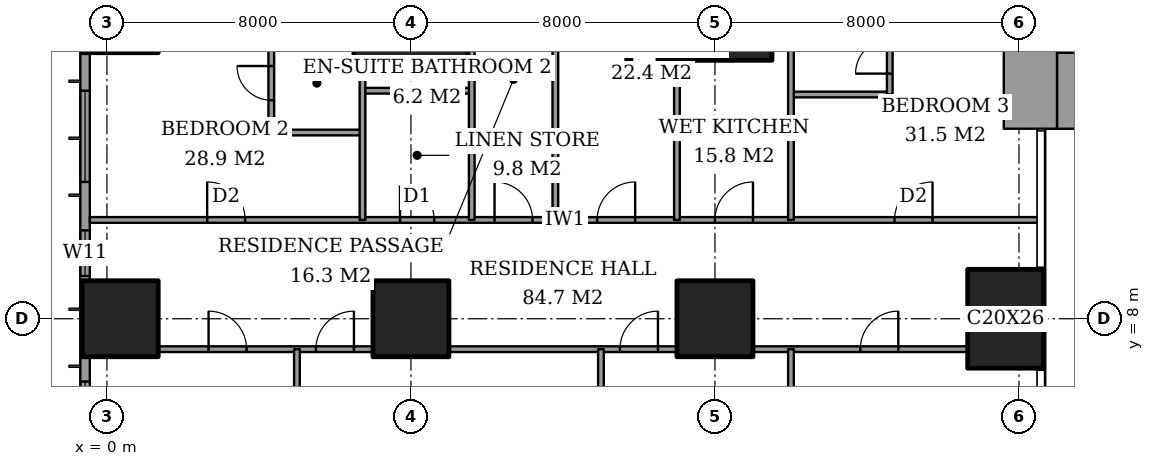
"""IFC4 building model, lengths in metres.
Left out: names, types, materials, properties, quantities, classifications, styles, units other than length and angle.
Written with IfcOpenShell. Run it as: python <this file> out.ifc"""

import sys

from ifc_helpers import new_model, si_unit, direction, frame, frame_2d, origin, origin_2d, place, context, subcontext, project, spatial, rectangle, extrude, element, fill, save


model = new_model("IFC4")
c1 = context("Model", 3, precision=1e-05, world=origin(), true_north=direction((0.0, 1.0)))
c2 = subcontext(c1, "Body", "Model", "MODEL_VIEW")
j1 = project(units=[si_unit("LENGTHUNIT", "METRE"), si_unit("PLANEANGLEUNIT", "RADIAN")], contexts=[c1])
p1 = place(None, origin())
s1 = spatial("IfcSite", under=j1, at=p1, CompositionType="ELEMENT")
p2 = place(p1, origin())
s2 = spatial("IfcBuilding", under=s1, at=p2, CompositionType="ELEMENT")
p3 = place(p2, frame((0.0, 0.0, 168.2)))
s3 = spatial("IfcBuildingStorey", under=s2, at=p3, CompositionType="ELEMENT", Elevation=168.2)
for number, where, z_axis, x_axis in (
    (1, (0.35, 8.0, 0.0), (0.0, 0.0, 1.0), (1.0, 0.0, 0.0)),
    (2, (8.0, 8.0, 0.0), (0.0, 0.0, 1.0), (1.0, 0.0, 0.0)),
):
    element("IfcColumn", number, at=place(p3, frame(where, z_axis=z_axis, x_axis=x_axis)), inside=s3, PredefinedType="COLUMN", context=c2, shape_type="SweptSolid", body=[
        extrude(rectangle(XDim=2.0, YDim=2.0, at=origin_2d()), origin(), (0.0, 0.0, 1.0), 3.6),
    ])
p4 = place(p3, frame((8.0, 16.0, 0.0), z_axis=(0.0, 0.0, 1.0), x_axis=(1.0, 0.0, 0.0)))
e3 = element("IfcColumn", 3, at=p4, inside=s3, PredefinedType="COLUMN", context=c2, shape_type="SweptSolid", body=[
    extrude(rectangle(XDim=3.0, YDim=2.4, at=origin_2d()), origin(), (0.0, 0.0, 1.0), 3.6),
])
p5 = place(p3, frame((16.0, 8.0, 0.0), z_axis=(0.0, 0.0, 1.0), x_axis=(1.0, 0.0, 0.0)))
e4 = element("IfcColumn", 4, at=p5, inside=s3, PredefinedType="COLUMN", context=c2, shape_type="SweptSolid", body=[
    extrude(rectangle(XDim=2.0, YDim=2.0, at=origin_2d()), origin(), (0.0, 0.0, 1.0), 3.6),
])
p6 = place(p3, frame((16.0, 16.0, 0.0), z_axis=(0.0, 0.0, 1.0), x_axis=(1.0, 0.0, 0.0)))
e5 = element("IfcColumn", 5, at=p6, inside=s3, PredefinedType="COLUMN", context=c2, shape_type="SweptSolid", body=[
    extrude(rectangle(XDim=3.0, YDim=2.4, at=origin_2d()), origin(), (0.0, 0.0, 1.0), 3.6),
])
p7 = place(p3, frame((23.65, 8.0, 0.0), z_axis=(0.0, 0.0, 1.0), x_axis=(1.0, 0.0, 0.0)))
e6 = element("IfcColumn", 6, at=p7, inside=s3, PredefinedType="COLUMN", context=c2, shape_type="SweptSolid", body=[
    extrude(rectangle(XDim=2.0, YDim=2.6, at=origin_2d()), origin(), (0.0, 0.0, 1.0), 3.6),
])
p8 = place(p3, frame((25.0, 14.0, 0.0), z_axis=(0.0, 0.0, 1.0), x_axis=(1.0, 0.0, 0.0)))
e7 = element("IfcWall", 7, at=p8, inside=s3, PredefinedType="SHEAR", context=c2, shape_type="SweptSolid", body=[
    extrude(rectangle(XDim=3.15, YDim=2.0, at=frame_2d((1.575, 0.0))), origin(), (0.0, 0.0, 1.0), 3.6),
])
p9 = place(p3, frame((24.3, 13.0, 0.0), z_axis=(0.0, 0.0, 1.0), x_axis=(0.0, 1.0, 0.0)))
e8 = element("IfcWall", 8, at=p9, inside=s3, PredefinedType="SHEAR", context=c2, shape_type="SweptSolid", body=[
    extrude(rectangle(XDim=10.15, YDim=1.4, at=frame_2d((5.075, 0.0))), origin(), (0.0, 0.0, 1.0), 3.6),
])
p10 = place(p3, frame((-0.575, 44.825, 0.0), z_axis=(0.0, 0.0, 1.0), x_axis=(0.0, -1.0, 0.0)))
e9 = element("IfcWall", 9, at=p10, inside=s3, PredefinedType="SOLIDWALL", context=c2, shape_type="SweptSolid", body=[
    extrude(rectangle(XDim=41.65, YDim=0.25, at=frame_2d((20.825, 0.0))), origin(), (0.0, 0.0, 1.0), 3.6),
])
p11 = place(p10, frame((0.775, 0.0, 0.4)))
e10 = element("IfcOpeningElement", 10, at=p11, cuts=e9, PredefinedType="OPENING", context=c2, shape_type="SweptSolid", body=[
    extrude(rectangle(XDim=2.4, YDim=2.2, at=frame_2d((1.2, 1.1))), frame((0.0, 0.135, 0.0), z_axis=(0.0, -1.0, 0.0), x_axis=(1.0, 0.0, 0.0)), (0.0, 0.0, 1.0), 0.27),
])
p12 = place(p10, frame((6.1, 0.0, 0.4)))
e11 = element("IfcOpeningElement", 11, at=p12, cuts=e9, PredefinedType="OPENING", context=c2, shape_type="SweptSolid", body=[
    extrude(rectangle(XDim=1.2, YDim=2.2, at=frame_2d((0.6, 1.1))), frame((0.0, 0.135, 0.0), z_axis=(0.0, -1.0, 0.0), x_axis=(1.0, 0.0, 0.0)), (0.0, 0.0, 1.0), 0.27),
])
p13 = place(p10, frame((8.425, 0.0, 0.4)))
e12 = element("IfcOpeningElement", 12, at=p13, cuts=e9, PredefinedType="OPENING", context=c2, shape_type="SweptSolid", body=[
    extrude(rectangle(XDim=2.4, YDim=2.2, at=frame_2d((1.2, 1.1))), frame((0.0, 0.135, 0.0), z_axis=(0.0, -1.0, 0.0), x_axis=(1.0, 0.0, 0.0)), (0.0, 0.0, 1.0), 0.27),
])
p14 = place(p10, frame((15.625, 0.0, 0.4)))
e13 = element("IfcOpeningElement", 13, at=p14, cuts=e9, PredefinedType="OPENING", context=c2, shape_type="SweptSolid", body=[
    extrude(rectangle(XDim=2.4, YDim=2.2, at=frame_2d((1.2, 1.1))), frame((0.0, 0.135, 0.0), z_axis=(0.0, -1.0, 0.0), x_axis=(1.0, 0.0, 0.0)), (0.0, 0.0, 1.0), 0.27),
])
p15 = place(p10, frame((23.625, 0.0, 0.4)))
e14 = element("IfcOpeningElement", 14, at=p15, cuts=e9, PredefinedType="OPENING", context=c2, shape_type="SweptSolid", body=[
    extrude(rectangle(XDim=2.4, YDim=2.2, at=frame_2d((1.2, 1.1))), frame((0.0, 0.135, 0.0), z_axis=(0.0, -1.0, 0.0), x_axis=(1.0, 0.0, 0.0)), (0.0, 0.0, 1.0), 0.27),
])
p16 = place(p10, frame((30.825, 0.0, 0.4)))
e15 = element("IfcOpeningElement", 15, at=p16, cuts=e9, PredefinedType="OPENING", context=c2, shape_type="SweptSolid", body=[
    extrude(rectangle(XDim=2.4, YDim=2.2, at=frame_2d((1.2, 1.1))), frame((0.0, 0.135, 0.0), z_axis=(0.0, -1.0, 0.0), x_axis=(1.0, 0.0, 0.0)), (0.0, 0.0, 1.0), 0.27),
])
p17 = place(p10, frame((34.5, 0.0, 0.4)))
e16 = element("IfcOpeningElement", 16, at=p17, cuts=e9, PredefinedType="OPENING", context=c2, shape_type="SweptSolid", body=[
    extrude(rectangle(XDim=1.2, YDim=2.2, at=frame_2d((0.6, 1.1))), frame((0.0, 0.135, 0.0), z_axis=(0.0, -1.0, 0.0), x_axis=(1.0, 0.0, 0.0)), (0.0, 0.0, 1.0), 0.27),
])
p18 = place(p10, frame((38.475, 0.0, 0.4)))
e17 = element("IfcOpeningElement", 17, at=p18, cuts=e9, PredefinedType="OPENING", context=c2, shape_type="SweptSolid", body=[
    extrude(rectangle(XDim=2.4, YDim=2.2, at=frame_2d((1.2, 1.1))), frame((0.0, 0.135, 0.0), z_axis=(0.0, -1.0, 0.0), x_axis=(1.0, 0.0, 0.0)), (0.0, 0.0, 1.0), 0.27),
])
p19 = place(p3, frame((1.35, 7.2, 0.0), z_axis=(0.0, 0.0, 1.0), x_axis=(1.0, 0.0, 0.0)))
e18 = element("IfcWall", 18, at=p19, inside=s3, PredefinedType="PARTITIONING", context=c2, shape_type="SweptSolid", body=[
    extrude(rectangle(XDim=5.65, YDim=0.15, at=frame_2d((2.825, 0.0))), origin(), (0.0, 0.0, 1.0), 3.25),
])
p20 = place(p19, frame((1.325, 0.0, 0.0)))
e19 = element("IfcOpeningElement", 19, at=p20, cuts=e18, PredefinedType="OPENING", context=c2, shape_type="SweptSolid", body=[
    extrude(rectangle(XDim=1.0, YDim=2.1, at=frame_2d((0.5, 1.05))), frame((0.0, 0.085, 0.0), z_axis=(0.0, -1.0, 0.0), x_axis=(1.0, 0.0, 0.0)), (0.0, 0.0, 1.0), 0.17),
])
p21 = place(p19, frame((4.15, 0.0, 0.0)))
e20 = element("IfcOpeningElement", 20, at=p21, cuts=e18, PredefinedType="OPENING", context=c2, shape_type="SweptSolid", body=[
    extrude(rectangle(XDim=1.0, YDim=2.1, at=frame_2d((0.5, 1.05))), frame((0.0, 0.085, 0.0), z_axis=(0.0, -1.0, 0.0), x_axis=(1.0, 0.0, 0.0)), (0.0, 0.0, 1.0), 0.17),
])
p22 = place(p3, frame((9.0, 7.2, 0.0), z_axis=(0.0, 0.0, 1.0), x_axis=(1.0, 0.0, 0.0)))
e21 = element("IfcWall", 21, at=p22, inside=s3, PredefinedType="PARTITIONING", context=c2, shape_type="SweptSolid", body=[
    extrude(rectangle(XDim=6.0, YDim=0.15, at=frame_2d((3.0, 0.0))), origin(), (0.0, 0.0, 1.0), 3.25),
])
p23 = place(p22, frame((4.5, 0.0, 0.0)))
e22 = element("IfcOpeningElement", 22, at=p23, cuts=e21, PredefinedType="OPENING", context=c2, shape_type="SweptSolid", body=[
    extrude(rectangle(XDim=1.0, YDim=2.1, at=frame_2d((0.5, 1.05))), frame((0.0, 0.085, 0.0), z_axis=(0.0, -1.0, 0.0), x_axis=(1.0, 0.0, 0.0)), (0.0, 0.0, 1.0), 0.17),
])
p24 = place(p3, frame((17.0, 7.2, 0.0), z_axis=(0.0, 0.0, 1.0), x_axis=(1.0, 0.0, 0.0)))
e23 = element("IfcWall", 23, at=p24, inside=s3, PredefinedType="PARTITIONING", context=c2, shape_type="SweptSolid", body=[
    extrude(rectangle(XDim=5.65, YDim=0.15, at=frame_2d((2.825, 0.0))), origin(), (0.0, 0.0, 1.0), 3.25),
])
p25 = place(p24, frame((2.825, 0.0, 0.0)))
e24 = element("IfcOpeningElement", 24, at=p25, cuts=e23, PredefinedType="OPENING", context=c2, shape_type="SweptSolid", body=[
    extrude(rectangle(XDim=1.0, YDim=2.1, at=frame_2d((0.5, 1.05))), frame((0.0, 0.085, 0.0), z_axis=(0.0, -1.0, 0.0), x_axis=(1.0, 0.0, 0.0)), (0.0, 0.0, 1.0), 0.17),
])
p26 = place(p3, frame((-0.45, 10.6, 0.0), z_axis=(0.0, 0.0, 1.0), x_axis=(1.0, 0.0, 0.0)))
e25 = element("IfcWall", 25, at=p26, inside=s3, PredefinedType="PARTITIONING", context=c2, shape_type="SweptSolid", body=[
    extrude(rectangle(XDim=25.011, YDim=0.15, at=frame_2d((12.505, 0.0))), origin(), (0.0, 0.0, 1.0), 3.25),
])
p27 = place(p26, frame((10.65, 0.0, 0.0)))
e26 = element("IfcOpeningElement", 26, at=p27, cuts=e25, PredefinedType="OPENING", context=c2, shape_type="SweptSolid", body=[
    extrude(rectangle(XDim=1.0, YDim=2.1, at=frame_2d((0.5, 1.05))), frame((0.0, 0.085, 0.0), z_axis=(0.0, -1.0, 0.0), x_axis=(1.0, 0.0, 0.0)), (0.0, 0.0, 1.0), 0.17),
])
p28 = place(p26, frame((3.087, 0.0, 0.0)))
e27 = element("IfcOpeningElement", 27, at=p28, cuts=e25, PredefinedType="OPENING", context=c2, shape_type="SweptSolid", body=[
    extrude(rectangle(XDim=1.0, YDim=2.1, at=frame_2d((0.5, 1.05))), frame((0.0, 0.085, 0.0), z_axis=(0.0, -1.0, 0.0), x_axis=(1.0, 0.0, 0.0)), (0.0, 0.0, 1.0), 0.17),
])
p29 = place(p26, frame((8.163, 0.0, 0.0)))
e28 = element("IfcOpeningElement", 28, at=p29, cuts=e25, PredefinedType="OPENING", context=c2, shape_type="SweptSolid", body=[
    extrude(rectangle(XDim=0.9, YDim=2.1, at=frame_2d((0.45, 1.05))), frame((0.0, 0.085, 0.0), z_axis=(0.0, -1.0, 0.0), x_axis=(1.0, 0.0, 0.0)), (0.0, 0.0, 1.0), 0.17),
])
p30 = place(p26, frame((13.35, 0.0, 0.0)))
e29 = element("IfcOpeningElement", 29, at=p30, cuts=e25, PredefinedType="OPENING", context=c2, shape_type="SweptSolid", body=[
    extrude(rectangle(XDim=1.0, YDim=2.1, at=frame_2d((0.5, 1.05))), frame((0.0, 0.085, 0.0), z_axis=(0.0, -1.0, 0.0), x_axis=(1.0, 0.0, 0.0)), (0.0, 0.0, 1.0), 0.17),
])
p31 = place(p26, frame((16.45, 0.0, 0.0)))
e30 = element("IfcOpeningElement", 30, at=p31, cuts=e25, PredefinedType="OPENING", context=c2, shape_type="SweptSolid", body=[
    extrude(rectangle(XDim=1.0, YDim=2.1, at=frame_2d((0.5, 1.05))), frame((0.0, 0.085, 0.0), z_axis=(0.0, -1.0, 0.0), x_axis=(1.0, 0.0, 0.0)), (0.0, 0.0, 1.0), 0.17),
])
p32 = place(p26, frame((21.175, 0.0, 0.0)))
e31 = element("IfcOpeningElement", 31, at=p32, cuts=e25, PredefinedType="OPENING", context=c2, shape_type="SweptSolid", body=[
    extrude(rectangle(XDim=1.0, YDim=2.1, at=frame_2d((0.5, 1.05))), frame((0.0, 0.085, 0.0), z_axis=(0.0, -1.0, 0.0), x_axis=(1.0, 0.0, 0.0)), (0.0, 0.0, 1.0), 0.17),
])
p33 = place(p3, frame((4.325, 12.9, 0.0), z_axis=(0.0, 0.0, 1.0), x_axis=(1.0, 0.0, 0.0)))
e32 = element("IfcWall", 32, at=p33, inside=s3, PredefinedType="PARTITIONING", context=c2, shape_type="SweptSolid", body=[
    extrude(rectangle(XDim=2.4, YDim=0.15, at=frame_2d((1.2, 0.0))), origin(), (0.0, 0.0, 1.0), 3.25),
])
p34 = place(p3, frame((18.0, 13.9, 0.0), z_axis=(0.0, 0.0, 1.0), x_axis=(1.0, 0.0, 0.0)))
e33 = element("IfcWall", 33, at=p34, inside=s3, PredefinedType="PARTITIONING", context=c2, shape_type="SweptSolid", body=[
    extrude(rectangle(XDim=2.6, YDim=0.15, at=frame_2d((1.3, 0.0))), origin(), (0.0, 0.0, 1.0), 3.25),
])
p35 = place(p3, frame((6.725, 14.0, 0.0), z_axis=(0.0, 0.0, 1.0), x_axis=(1.0, 0.0, 0.0)))
e34 = element("IfcWall", 34, at=p35, inside=s3, PredefinedType="PARTITIONING", context=c2, shape_type="SweptSolid", body=[
    extrude(rectangle(XDim=2.875, YDim=0.15, at=frame_2d((1.438, 0.0))), origin(), (0.0, 0.0, 1.0), 3.25),
])
p36 = place(p3, frame((4.325, 12.9, 0.0), z_axis=(0.0, 0.0, 1.0), x_axis=(0.0, 1.0, 0.0)))
e35 = element("IfcWall", 35, at=p36, inside=s3, PredefinedType="PARTITIONING", context=c2, shape_type="SweptSolid", body=[
    extrude(rectangle(XDim=2.6, YDim=0.15, at=frame_2d((1.3, 0.0))), origin(), (0.0, 0.0, 1.0), 3.25),
])
p37 = place(p36, frame((0.85, 0.0, 0.0)))
e36 = element("IfcOpeningElement", 36, at=p37, cuts=e35, PredefinedType="OPENING", context=c2, shape_type="SweptSolid", body=[
    extrude(rectangle(XDim=0.9, YDim=2.1, at=frame_2d((0.45, 1.05))), frame((0.0, 0.085, 0.0), z_axis=(0.0, -1.0, 0.0), x_axis=(1.0, 0.0, 0.0)), (0.0, 0.0, 1.0), 0.17),
])
p38 = place(p3, frame((5.0, -0.45, 0.0), z_axis=(0.0, 0.0, 1.0), x_axis=(0.0, 1.0, 0.0)))
e37 = element("IfcWall", 37, at=p38, inside=s3, PredefinedType="PARTITIONING", context=c2, shape_type="SweptSolid", body=[
    extrude(rectangle(XDim=7.65, YDim=0.15, at=frame_2d((3.825, 0.0))), origin(), (0.0, 0.0, 1.0), 3.25),
])
p39 = place(p3, frame((6.725, 10.6, 0.0), z_axis=(0.0, 0.0, 1.0), x_axis=(0.0, 1.0, 0.0)))
e38 = element("IfcWall", 38, at=p39, inside=s3, PredefinedType="PARTITIONING", context=c2, shape_type="SweptSolid", body=[
    extrude(rectangle(XDim=4.2, YDim=0.15, at=frame_2d((2.1, 0.0))), origin(), (0.0, 0.0, 1.0), 3.25),
])
p40 = place(p3, frame((9.6, 10.6, 0.0), z_axis=(0.0, 0.0, 1.0), x_axis=(0.0, 1.0, 0.0)))
e39 = element("IfcWall", 39, at=p40, inside=s3, PredefinedType="PARTITIONING", context=c2, shape_type="SweptSolid", body=[
    extrude(rectangle(XDim=11.0, YDim=0.15, at=frame_2d((5.5, 0.0))), origin(), (0.0, 0.0, 1.0), 3.25),
])
p41 = place(p40, frame((8.7, 0.0, 0.0)))
e40 = element("IfcOpeningElement", 40, at=p41, cuts=e39, PredefinedType="OPENING", context=c2, shape_type="SweptSolid", body=[
    extrude(rectangle(XDim=1.0, YDim=2.1, at=frame_2d((0.5, 1.05))), frame((0.0, 0.085, 0.0), z_axis=(0.0, -1.0, 0.0), x_axis=(1.0, 0.0, 0.0)), (0.0, 0.0, 1.0), 0.17),
])
p42 = place(p3, frame((11.8, 10.6, 0.0), z_axis=(0.0, 0.0, 1.0), x_axis=(0.0, 1.0, 0.0)))
e41 = element("IfcWall", 41, at=p42, inside=s3, PredefinedType="PARTITIONING", context=c2, shape_type="SweptSolid", body=[
    extrude(rectangle(XDim=7.4, YDim=0.15, at=frame_2d((3.7, 0.0))), origin(), (0.0, 0.0, 1.0), 3.25),
])
p43 = place(p3, frame((13.0, -0.45, 0.0), z_axis=(0.0, 0.0, 1.0), x_axis=(0.0, 1.0, 0.0)))
e42 = element("IfcWall", 42, at=p43, inside=s3, PredefinedType="PARTITIONING", context=c2, shape_type="SweptSolid", body=[
    extrude(rectangle(XDim=7.65, YDim=0.15, at=frame_2d((3.825, 0.0))), origin(), (0.0, 0.0, 1.0), 3.25),
])
p44 = place(p3, frame((15.0, 10.6, 0.0), z_axis=(0.0, 0.0, 1.0), x_axis=(0.0, 1.0, 0.0)))
e43 = element("IfcWall", 43, at=p44, inside=s3, PredefinedType="PARTITIONING", context=c2, shape_type="SweptSolid", body=[
    extrude(rectangle(XDim=4.2, YDim=0.15, at=frame_2d((2.1, 0.0))), origin(), (0.0, 0.0, 1.0), 3.25),
])
p45 = place(p3, frame((18.0, -0.45, 0.0), z_axis=(0.0, 0.0, 1.0), x_axis=(0.0, 1.0, 0.0)))
e44 = element("IfcWall", 44, at=p45, inside=s3, PredefinedType="PARTITIONING", context=c2, shape_type="SweptSolid", body=[
    extrude(rectangle(XDim=7.65, YDim=0.15, at=frame_2d((3.825, 0.0))), origin(), (0.0, 0.0, 1.0), 3.25),
])
p46 = place(p3, frame((18.0, 10.6, 0.0), z_axis=(0.0, 0.0, 1.0), x_axis=(0.0, 1.0, 0.0)))
e45 = element("IfcWall", 45, at=p46, inside=s3, PredefinedType="PARTITIONING", context=c2, shape_type="SweptSolid", body=[
    extrude(rectangle(XDim=7.4, YDim=0.15, at=frame_2d((3.7, 0.0))), origin(), (0.0, 0.0, 1.0), 3.25),
])
p47 = place(p3, frame((20.6, 13.9, 0.0), z_axis=(0.0, 0.0, 1.0), x_axis=(0.0, 1.0, 0.0)))
e46 = element("IfcWall", 46, at=p47, inside=s3, PredefinedType="PARTITIONING", context=c2, shape_type="SweptSolid", body=[
    extrude(rectangle(XDim=3.0, YDim=0.15, at=frame_2d((1.5, 0.0))), origin(), (0.0, 0.0, 1.0), 3.25),
])
p48 = place(p47, frame((0.55, 0.0, 0.0)))
e47 = element("IfcOpeningElement", 47, at=p48, cuts=e46, PredefinedType="OPENING", context=c2, shape_type="SweptSolid", body=[
    extrude(rectangle(XDim=0.9, YDim=2.1, at=frame_2d((0.45, 1.05))), frame((0.0, 0.085, 0.0), z_axis=(0.0, -1.0, 0.0), x_axis=(1.0, 0.0, 0.0)), (0.0, 0.0, 1.0), 0.17),
])
p49 = place(p16, origin())
e48 = element("IfcWindow", 48, at=p49, inside=s3, PartitioningType="SINGLE_PANEL", PredefinedType="WINDOW", context=c2, shape_type="SweptSolid", body=[
    extrude(rectangle(XDim=2.4, YDim=2.2, at=frame_2d((1.2, 1.1))), frame((0.0, 0.03, 0.0), z_axis=(0.0, -1.0, 0.0), x_axis=(1.0, 0.0, 0.0)), (0.0, 0.0, 1.0), 0.06),
])
fill(e15, e48)
p50 = place(p17, origin())
e49 = element("IfcWindow", 49, at=p50, inside=s3, PartitioningType="SINGLE_PANEL", PredefinedType="WINDOW", context=c2, shape_type="SweptSolid", body=[
    extrude(rectangle(XDim=1.2, YDim=2.2, at=frame_2d((0.6, 1.1))), frame((0.0, 0.03, 0.0), z_axis=(0.0, -1.0, 0.0), x_axis=(1.0, 0.0, 0.0)), (0.0, 0.0, 1.0), 0.06),
])
fill(e16, e49)
p51 = place(p18, origin())
e50 = element("IfcWindow", 50, at=p51, inside=s3, PartitioningType="SINGLE_PANEL", PredefinedType="WINDOW", context=c2, shape_type="SweptSolid", body=[
    extrude(rectangle(XDim=2.4, YDim=2.2, at=frame_2d((1.2, 1.1))), frame((0.0, 0.03, 0.0), z_axis=(0.0, -1.0, 0.0), x_axis=(1.0, 0.0, 0.0)), (0.0, 0.0, 1.0), 0.06),
])
fill(e17, e50)
p52 = place(p20, origin())
e51 = element("IfcDoor", 51, at=p52, inside=s3, OperationType="SINGLE_SWING_RIGHT", PredefinedType="DOOR", context=c2, shape_type="SweptSolid", body=[
    extrude(rectangle(XDim=1.0, YDim=2.1, at=frame_2d((0.5, 1.05))), frame((0.0, 0.025, 0.0), z_axis=(0.0, -1.0, 0.0), x_axis=(1.0, 0.0, 0.0)), (0.0, 0.0, 1.0), 0.05),
])
fill(e19, e51)
p53 = place(p21, origin())
e52 = element("IfcDoor", 52, at=p53, inside=s3, OperationType="SINGLE_SWING_LEFT", PredefinedType="DOOR", context=c2, shape_type="SweptSolid", body=[
    extrude(rectangle(XDim=1.0, YDim=2.1, at=frame_2d((0.5, 1.05))), frame((0.0, 0.025, 0.0), z_axis=(0.0, -1.0, 0.0), x_axis=(1.0, 0.0, 0.0)), (0.0, 0.0, 1.0), 0.05),
])
fill(e20, e52)
p54 = place(p23, origin())
e53 = element("IfcDoor", 53, at=p54, inside=s3, OperationType="SINGLE_SWING_LEFT", PredefinedType="DOOR", context=c2, shape_type="SweptSolid", body=[
    extrude(rectangle(XDim=1.0, YDim=2.1, at=frame_2d((0.5, 1.05))), frame((0.0, 0.025, 0.0), z_axis=(0.0, -1.0, 0.0), x_axis=(1.0, 0.0, 0.0)), (0.0, 0.0, 1.0), 0.05),
])
fill(e22, e53)
p55 = place(p25, origin())
e54 = element("IfcDoor", 54, at=p55, inside=s3, OperationType="SINGLE_SWING_LEFT", PredefinedType="DOOR", context=c2, shape_type="SweptSolid", body=[
    extrude(rectangle(XDim=1.0, YDim=2.1, at=frame_2d((0.5, 1.05))), frame((0.0, 0.025, 0.0), z_axis=(0.0, -1.0, 0.0), x_axis=(1.0, 0.0, 0.0)), (0.0, 0.0, 1.0), 0.05),
])
fill(e24, e54)
p56 = place(p27, origin())
e55 = element("IfcDoor", 55, at=p56, inside=s3, OperationType="SINGLE_SWING_RIGHT", PredefinedType="DOOR", context=c2, shape_type="SweptSolid", body=[
    extrude(rectangle(XDim=1.0, YDim=2.1, at=frame_2d((0.5, 1.05))), frame((0.0, 0.025, 0.0), z_axis=(0.0, -1.0, 0.0), x_axis=(1.0, 0.0, 0.0)), (0.0, 0.0, 1.0), 0.05),
])
fill(e26, e55)
p57 = place(p37, origin())
e56 = element("IfcDoor", 56, at=p57, inside=s3, OperationType="SINGLE_SWING_LEFT", PredefinedType="DOOR", context=c2, shape_type="SweptSolid", body=[
    extrude(rectangle(XDim=0.9, YDim=2.1, at=frame_2d((0.45, 1.05))), frame((0.0, 0.025, 0.0), z_axis=(0.0, -1.0, 0.0), x_axis=(1.0, 0.0, 0.0)), (0.0, 0.0, 1.0), 0.05),
])
fill(e36, e56)
p58 = place(p28, origin())
e57 = element("IfcDoor", 57, at=p58, inside=s3, OperationType="SINGLE_SWING_RIGHT", PredefinedType="DOOR", context=c2, shape_type="SweptSolid", body=[
    extrude(rectangle(XDim=1.0, YDim=2.1, at=frame_2d((0.5, 1.05))), frame((0.0, 0.025, 0.0), z_axis=(0.0, -1.0, 0.0), x_axis=(1.0, 0.0, 0.0)), (0.0, 0.0, 1.0), 0.05),
])
fill(e27, e57)
p59 = place(p29, origin())
e58 = element("IfcDoor", 58, at=p59, inside=s3, OperationType="SINGLE_SWING_RIGHT", PredefinedType="DOOR", context=c2, shape_type="SweptSolid", body=[
    extrude(rectangle(XDim=0.9, YDim=2.1, at=frame_2d((0.45, 1.05))), frame((0.0, 0.025, 0.0), z_axis=(0.0, -1.0, 0.0), x_axis=(1.0, 0.0, 0.0)), (0.0, 0.0, 1.0), 0.05),
])
fill(e28, e58)
p60 = place(p30, origin())
e59 = element("IfcDoor", 59, at=p60, inside=s3, OperationType="SINGLE_SWING_LEFT", PredefinedType="DOOR", context=c2, shape_type="SweptSolid", body=[
    extrude(rectangle(XDim=1.0, YDim=2.1, at=frame_2d((0.5, 1.05))), frame((0.0, 0.025, 0.0), z_axis=(0.0, -1.0, 0.0), x_axis=(1.0, 0.0, 0.0)), (0.0, 0.0, 1.0), 0.05),
])
fill(e29, e59)
p61 = place(p31, origin())
e60 = element("IfcDoor", 60, at=p61, inside=s3, OperationType="SINGLE_SWING_LEFT", PredefinedType="DOOR", context=c2, shape_type="SweptSolid", body=[
    extrude(rectangle(XDim=1.0, YDim=2.1, at=frame_2d((0.5, 1.05))), frame((0.0, 0.025, 0.0), z_axis=(0.0, -1.0, 0.0), x_axis=(1.0, 0.0, 0.0)), (0.0, 0.0, 1.0), 0.05),
])
fill(e30, e60)
p62 = place(p48, origin())
e61 = element("IfcDoor", 61, at=p62, inside=s3, OperationType="SINGLE_SWING_RIGHT", PredefinedType="DOOR", context=c2, shape_type="SweptSolid", body=[
    extrude(rectangle(XDim=0.9, YDim=2.1, at=frame_2d((0.45, 1.05))), frame((0.0, 0.025, 0.0), z_axis=(0.0, -1.0, 0.0), x_axis=(1.0, 0.0, 0.0)), (0.0, 0.0, 1.0), 0.05),
])
fill(e47, e61)
p63 = place(p32, origin())
e62 = element("IfcDoor", 62, at=p63, inside=s3, OperationType="SINGLE_SWING_LEFT", PredefinedType="DOOR", context=c2, shape_type="SweptSolid", body=[
    extrude(rectangle(XDim=1.0, YDim=2.1, at=frame_2d((0.5, 1.05))), frame((0.0, 0.025, 0.0), z_axis=(0.0, -1.0, 0.0), x_axis=(1.0, 0.0, 0.0)), (0.0, 0.0, 1.0), 0.05),
])
fill(e31, e62)
save(model, sys.argv[1])
